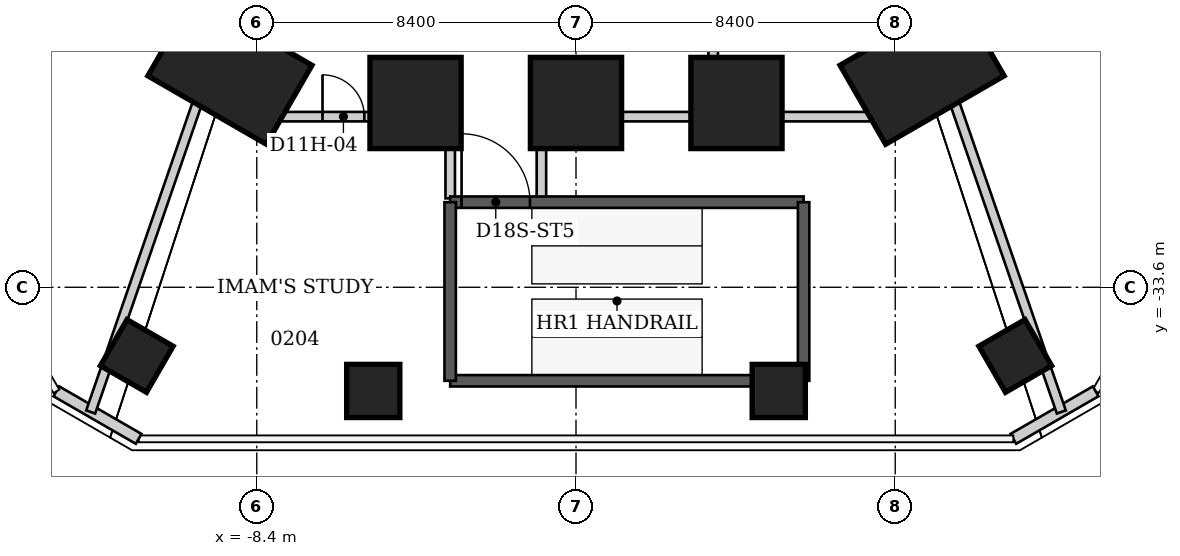
"""IFC4 building model, lengths in metres.
Left out: names, types, materials, properties, quantities, classifications, styles, units other than length and angle.
Written with IfcOpenShell. Run it as: python <this file> out.ifc"""

import sys

from ifc_helpers import new_model, si_unit, direction, frame, frame_2d, origin, origin_2d, place, context, subcontext, project, spatial, rectangle, extrude, element, fill, save


model = new_model("IFC4")
c1 = context("Model", 3, precision=1e-05, world=origin(), true_north=direction((0.0, 1.0)))
c2 = subcontext(c1, "Body", "Model", "MODEL_VIEW")
j1 = project(units=[si_unit("LENGTHUNIT", "METRE"), si_unit("PLANEANGLEUNIT", "RADIAN")], contexts=[c1])
p1 = place(None, origin())
s1 = spatial("IfcSite", under=j1, at=p1, CompositionType="ELEMENT")
p2 = place(p1, origin())
s2 = spatial("IfcBuilding", under=s1, at=p2, CompositionType="ELEMENT")
p3 = place(p2, frame((0.0, 0.0, 12.0)))
s3 = spatial("IfcBuildingStorey", under=s2, at=p3, CompositionType="ELEMENT", Elevation=12.0)
p4 = place(p3, frame((9.106, -27.897, 0.0), z_axis=(0.0, 0.0, 1.0), x_axis=(0.5, -0.866025403784, 0.0)))
e1 = element("IfcColumn", 1, at=p4, inside=s3, PredefinedType="COLUMN", context=c2, shape_type="SweptSolid", body=[
    extrude(rectangle(XDim=2.4, YDim=3.6, at=origin_2d()), origin(), (0.0, 0.0, 1.0), 6.0),
])
for number, where, z_axis, x_axis in (
    (2, (4.222, -28.751, 0.0), (0.0, 0.0, 1.0), (0.0, -1.0, 0.0)),
    (3, (0.0, -28.751, 0.0), (0.0, 0.0, 1.0), (0.0, -1.0, 0.0)),
    (4, (-4.222, -28.751, 0.0), (0.0, 0.0, 1.0), (0.0, -1.0, 0.0)),
):
    element("IfcColumn", number, at=place(p3, frame(where, z_axis=z_axis, x_axis=x_axis)), inside=s3, PredefinedType="COLUMN", context=c2, shape_type="SweptSolid", body=[
        extrude(rectangle(XDim=2.4, YDim=2.4, at=origin_2d()), origin(), (0.0, 0.0, 1.0), 6.0),
    ])
p5 = place(p3, frame((-9.106, -27.897, 0.0), z_axis=(0.0, 0.0, 1.0), x_axis=(-0.5, -0.866025403784, 0.0)))
e5 = element("IfcColumn", 5, at=p5, inside=s3, PredefinedType="COLUMN", context=c2, shape_type="SweptSolid", body=[
    extrude(rectangle(XDim=2.4, YDim=3.6, at=origin_2d()), origin(), (0.0, 0.0, 1.0), 6.0),
])
for number, where, z_axis, x_axis in (
    (6, (11.558, -35.408, 0.0), (0.0, 0.0, 1.0), (0.5, -0.866, 0.0)),
    (7, (5.335, -36.329, 0.0), (0.0, 0.0, 1.0), (0.0, -1.0, 0.0)),
    (8, (-5.335, -36.329, 0.0), (0.0, 0.0, 1.0), (0.0, -1.0, 0.0)),
    (9, (-11.558, -35.408, 0.0), (0.0, 0.0, 1.0), (-0.5, -0.866, 0.0)),
):
    element("IfcColumn", number, at=place(p3, frame(where, z_axis=z_axis, x_axis=x_axis)), inside=s3, PredefinedType="COLUMN", context=c2, shape_type="SweptSolid", body=[
        extrude(rectangle(XDim=1.4, YDim=1.4, at=origin_2d()), origin(), (0.0, 0.0, 1.0), 6.0),
    ])
for number, where, z_axis, x_axis in (
    (10, (13.674, -36.339, 0.0), (0.0, 0.0, 1.0), (-0.866, -0.5, 0.0)),
    (11, (-11.508, -37.589, 0.0), (0.0, 0.0, 1.0), (-0.866, 0.5, 0.0)),
):
    element("IfcWall", number, at=place(p3, frame(where, z_axis=z_axis, x_axis=x_axis)), inside=s3, PredefinedType="SOLIDWALL", context=c2, shape_type="SweptSolid", body=[
        extrude(rectangle(XDim=2.5, YDim=0.3, at=frame_2d((1.25, 0.0))), origin(), (0.0, 0.0, 1.0), 5.6),
    ])
p6 = place(p3, frame((-17.08, -16.52, 0.0), z_axis=(0.0, 0.0, 1.0), x_axis=(0.500484795969, -0.865745325719, 0.0)))
e12 = element("IfcWall", 12, at=p6, inside=s3, PredefinedType="PARTITIONING", context=c2, shape_type="SweptSolid", body=[
    extrude(rectangle(XDim=13.387, YDim=0.25, at=frame_2d((6.694, 0.0))), origin(), (0.0, 0.0, 1.0), 4.04),
])
p7 = place(p3, frame((-12.77, -36.882, 0.0), z_axis=(0.0, 0.0, 1.0), x_axis=(0.32622518394, 0.945292086798, 0.0)))
e13 = element("IfcWall", 13, at=p7, inside=s3, PredefinedType="PARTITIONING", context=c2, shape_type="SweptSolid", body=[
    extrude(rectangle(XDim=8.951, YDim=0.25, at=frame_2d((4.476, 0.0))), origin(), (0.0, 0.0, 1.0), 5.6),
])
p8 = place(p3, frame((-10.38, -28.11, 0.0), z_axis=(0.0, 0.0, 1.0), x_axis=(0.865714845822, -0.5005375168, 0.0)))
e14 = element("IfcWall", 14, at=p8, inside=s3, PredefinedType="PARTITIONING", context=c2, shape_type="SweptSolid", body=[
    extrude(rectangle(XDim=0.579, YDim=0.25, at=frame_2d((0.29, 0.0))), origin(), (0.0, 0.0, 1.0), 5.84),
])
p9 = place(p3, frame((-8.65, -29.11, 0.0), z_axis=(0.0, 0.0, 1.0), x_axis=(-0.866883441829, 0.498510880807, 0.0)))
e15 = element("IfcWall", 15, at=p9, inside=s3, PredefinedType="PARTITIONING", context=c2, shape_type="SweptSolid", body=[
    extrude(rectangle(XDim=1.385, YDim=0.25, at=frame_2d((0.692, 0.0))), origin(), (0.0, 0.0, 1.0), 5.84),
])
p10 = place(p3, frame((-8.65, -29.11, 0.0), z_axis=(0.0, 0.0, 1.0), x_axis=(1.0, 0.0, 0.0)))
e16 = element("IfcWall", 16, at=p10, inside=s3, PredefinedType="PARTITIONING", context=c2, shape_type="SweptSolid", body=[
    extrude(rectangle(XDim=0.82, YDim=0.25, at=frame_2d((0.41, 0.0))), origin(), (0.0, 0.0, 1.0), 5.84),
])
p11 = place(p3, frame((-7.83, -29.11, 0.0), z_axis=(0.0, 0.0, 1.0), x_axis=(0.0, 1.0, 0.0)))
e17 = element("IfcWall", 17, at=p11, inside=s3, PredefinedType="PARTITIONING", context=c2, shape_type="SweptSolid", body=[
    extrude(rectangle(XDim=2.4, YDim=0.25, at=frame_2d((1.2, 0.0))), origin(), (0.0, 0.0, 1.0), 5.84),
])
p12 = place(p3, frame((-7.83, -29.11, 0.0), z_axis=(0.0, 0.0, 1.0), x_axis=(1.0, 0.0, 0.0)))
e18 = element("IfcWall", 18, at=p12, inside=s3, PredefinedType="PARTITIONING", context=c2, shape_type="SweptSolid", body=[
    extrude(rectangle(XDim=4.52, YDim=0.25, at=frame_2d((2.26, 0.0))), origin(), (0.0, 0.0, 1.0), 4.04),
])
p13 = place(p12, frame((1.16, 0.0, 0.0)))
e19 = element("IfcOpeningElement", 19, at=p13, cuts=e18, PredefinedType="OPENING", context=c2, shape_type="SweptSolid", body=[
    extrude(rectangle(XDim=1.1, YDim=2.2, at=frame_2d((0.55, 1.1))), frame((0.0, 0.125, 0.0), z_axis=(0.0, -1.0, 0.0), x_axis=(1.0, 0.0, 0.0)), (0.0, 0.0, 1.0), 0.25),
])
for number, where, z_axis, x_axis in (
    (20, (-3.31, -29.11, 0.0), (0.0, 0.0, 1.0), (0.0, -1.0, 0.0)),
    (21, (-0.91, -31.26, 0.0), (0.0, 0.0, 1.0), (0.0, 1.0, 0.0)),
):
    element("IfcWall", number, at=place(p3, frame(where, z_axis=z_axis, x_axis=x_axis)), inside=s3, PredefinedType="PARTITIONING", context=c2, shape_type="SweptSolid", body=[
        extrude(rectangle(XDim=2.15, YDim=0.25, at=frame_2d((1.075, 0.0))), origin(), (0.0, 0.0, 1.0), 5.6),
    ])
p14 = place(p3, frame((-0.91, -29.11, 0.0), z_axis=(0.0, 0.0, 1.0), x_axis=(1.0, 0.0, 0.0)))
e22 = element("IfcWall", 22, at=p14, inside=s3, PredefinedType="PARTITIONING", context=c2, shape_type="SweptSolid", body=[
    extrude(rectangle(XDim=4.52, YDim=0.25, at=frame_2d((2.26, 0.0))), origin(), (0.0, 0.0, 1.0), 4.04),
])
p15 = place(p3, frame((3.61, -29.11, 0.0), z_axis=(0.0, 0.0, 1.0), x_axis=(1.0, 0.0, 0.0)))
e23 = element("IfcWall", 23, at=p15, inside=s3, PredefinedType="PARTITIONING", context=c2, shape_type="SweptSolid", body=[
    extrude(rectangle(XDim=5.04, YDim=0.25, at=frame_2d((2.52, 0.0))), origin(), (0.0, 0.0, 1.0), 4.04),
])
p16 = place(p3, frame((3.61, -26.71, 0.0), z_axis=(0.0, 0.0, 1.0), x_axis=(0.0, -1.0, 0.0)))
e24 = element("IfcWall", 24, at=p16, inside=s3, PredefinedType="PARTITIONING", context=c2, shape_type="SweptSolid", body=[
    extrude(rectangle(XDim=2.4, YDim=0.25, at=frame_2d((1.2, 0.0))), origin(), (0.0, 0.0, 1.0), 5.84),
])
p17 = place(p3, frame((8.65, -29.11, 0.0), z_axis=(0.0, 0.0, 1.0), x_axis=(0.865736025111, 0.500500883941, 0.0)))
e25 = element("IfcWall", 25, at=p17, inside=s3, PredefinedType="PARTITIONING", context=c2, shape_type="SweptSolid", body=[
    extrude(rectangle(XDim=1.384, YDim=0.25, at=frame_2d((0.692, 0.0))), origin(), (0.0, 0.0, 1.0), 5.84),
])
p18 = place(p3, frame((8.69, -26.21, 0.0), z_axis=(0.0, 0.0, 1.0), x_axis=(0.865442434468, -0.5010083758, 0.0)))
e26 = element("IfcWall", 26, at=p18, inside=s3, PredefinedType="PARTITIONING", context=c2, shape_type="SweptSolid", body=[
    extrude(rectangle(XDim=2.415, YDim=0.25, at=frame_2d((1.208, 0.0))), origin(), (0.0, 0.0, 1.0), 5.84),
])
p19 = place(p3, frame((10.38, -28.11, 0.0), z_axis=(0.0, 0.0, 1.0), x_axis=(-0.865714845822, -0.5005375168, 0.0)))
e27 = element("IfcWall", 27, at=p19, inside=s3, PredefinedType="PARTITIONING", context=c2, shape_type="SweptSolid", body=[
    extrude(rectangle(XDim=0.579, YDim=0.25, at=frame_2d((0.29, 0.0))), origin(), (0.0, 0.0, 1.0), 5.84),
])
p20 = place(p3, frame((10.78, -27.42, 0.0), z_axis=(0.0, 0.0, 1.0), x_axis=(0.501133997532, 0.86536969933, 0.0)))
e28 = element("IfcWall", 28, at=p20, inside=s3, PredefinedType="PARTITIONING", context=c2, shape_type="SweptSolid", body=[
    extrude(rectangle(XDim=4.53, YDim=0.25, at=frame_2d((2.265, 0.0))), origin(), (0.0, 0.0, 1.0), 4.04),
])
p21 = place(p3, frame((10.79, -27.42, 0.0), z_axis=(0.0, 0.0, 1.0), x_axis=(-0.510777713782, -0.859712816645, 0.0)))
e29 = element("IfcWall", 29, at=p21, inside=s3, PredefinedType="PARTITIONING", context=c2, shape_type="SweptSolid", body=[
    extrude(rectangle(XDim=0.802, YDim=0.25, at=frame_2d((0.401, 0.0))), origin(), (0.0, 0.0, 1.0), 5.84),
])
p22 = place(p3, frame((12.77, -36.882, 0.0), z_axis=(0.0, 0.0, 1.0), x_axis=(-0.32622518394, 0.945292086798, 0.0)))
e30 = element("IfcWall", 30, at=p22, inside=s3, PredefinedType="PARTITIONING", context=c2, shape_type="SweptSolid", body=[
    extrude(rectangle(XDim=8.951, YDim=0.25, at=frame_2d((4.476, 0.0))), origin(), (0.0, 0.0, 1.0), 5.6),
])
p23 = place(p3, frame((-3.311, -31.361, 0.0), z_axis=(0.0, 0.0, 1.0), x_axis=(1.0, 0.0, 0.0)))
e31 = element("IfcWall", 31, at=p23, inside=s3, PredefinedType="SHEAR", context=c2, shape_type="SweptSolid", body=[
    extrude(rectangle(XDim=9.3, YDim=0.3, at=frame_2d((4.65, 0.0))), origin(), (0.0, 0.0, 1.0), 6.0),
])
p24 = place(p23, frame((0.3, 0.0, 0.0)))
e32 = element("IfcOpeningElement", 32, at=p24, cuts=e31, PredefinedType="OPENING", context=c2, shape_type="SweptSolid", body=[
    extrude(rectangle(XDim=1.8, YDim=2.4, at=frame_2d((0.9, 1.2))), frame((0.0, 0.15, 0.0), z_axis=(0.0, -1.0, 0.0), x_axis=(1.0, 0.0, 0.0)), (0.0, 0.0, 1.0), 0.3),
])
p25 = place(p3, frame((5.989, -31.361, 0.0), z_axis=(0.0, 0.0, 1.0), x_axis=(0.0, -1.0, 0.0)))
e33 = element("IfcWall", 33, at=p25, inside=s3, PredefinedType="SHEAR", context=c2, shape_type="SweptSolid", body=[
    extrude(rectangle(XDim=4.7, YDim=0.3, at=frame_2d((2.35, 0.0))), origin(), (0.0, 0.0, 1.0), 6.0),
])
p26 = place(p3, frame((5.989, -36.061, 0.0), z_axis=(0.0, 0.0, 1.0), x_axis=(-1.0, 0.0, 0.0)))
e34 = element("IfcWall", 34, at=p26, inside=s3, PredefinedType="SHEAR", context=c2, shape_type="SweptSolid", body=[
    extrude(rectangle(XDim=9.3, YDim=0.3, at=frame_2d((4.65, 0.0))), origin(), (0.0, 0.0, 1.0), 6.0),
])
p27 = place(p3, frame((-3.311, -36.061, 0.0), z_axis=(0.0, 0.0, 1.0), x_axis=(0.0, 1.0, 0.0)))
e35 = element("IfcWall", 35, at=p27, inside=s3, PredefinedType="SHEAR", context=c2, shape_type="SweptSolid", body=[
    extrude(rectangle(XDim=4.7, YDim=0.3, at=frame_2d((2.35, 0.0))), origin(), (0.0, 0.0, 1.0), 6.0),
])
p28 = place(p13, origin())
e36 = element("IfcDoor", 36, at=p28, inside=s3, OperationType="SINGLE_SWING_LEFT", PredefinedType="DOOR", context=c2, shape_type="SweptSolid", body=[
    extrude(rectangle(XDim=1.1, YDim=2.2, at=frame_2d((0.55, 1.1))), frame((0.0, 0.025, 0.0), z_axis=(0.0, -1.0, 0.0), x_axis=(1.0, 0.0, 0.0)), (0.0, 0.0, 1.0), 0.05),
])
fill(e19, e36)
p29 = place(p24, origin())
e37 = element("IfcDoor", 37, at=p29, inside=s3, OperationType="DOUBLE_DOOR_SINGLE_SWING", PredefinedType="DOOR", context=c2, shape_type="SweptSolid", body=[
    extrude(rectangle(XDim=1.8, YDim=2.4, at=frame_2d((0.9, 1.2))), frame((0.0, 0.025, 0.0), z_axis=(0.0, -1.0, 0.0), x_axis=(1.0, 0.0, 0.0)), (0.0, 0.0, 1.0), 0.05),
])
fill(e32, e37)
save(model, sys.argv[1])
